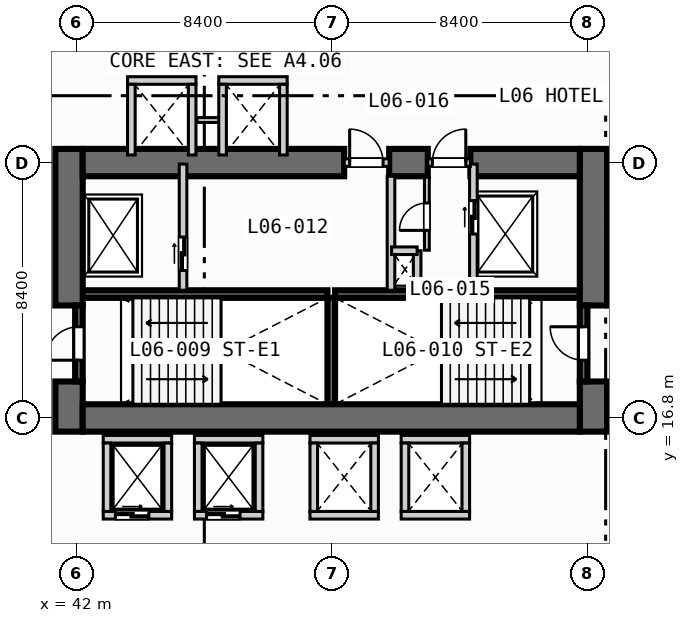
"""IFC4 building model, lengths in metres.
Left out: names, types, materials, properties, quantities, classifications, styles, units other than length and angle.
Written with IfcOpenShell. Run it as: python <this file> out.ifc"""

import sys

from ifc_helpers import new_model, si_unit, direction, frame, frame_2d, origin, place, context, subcontext, project, spatial, rectangle, extrude, element, fill, save


model = new_model("IFC4")
c1 = context("Model", 3, precision=1e-05, world=origin(), true_north=direction((0.0, 1.0)))
c2 = subcontext(c1, "Body", "Model", "MODEL_VIEW")
j1 = project(units=[si_unit("LENGTHUNIT", "METRE"), si_unit("PLANEANGLEUNIT", "RADIAN")], contexts=[c1])
p1 = place(None, origin())
s1 = spatial("IfcSite", under=j1, at=p1, CompositionType="ELEMENT")
p2 = place(p1, origin())
s2 = spatial("IfcBuilding", under=s1, at=p2, CompositionType="ELEMENT")
p3 = place(p2, frame((0.0, 0.0, 32.0)))
s3 = spatial("IfcBuildingStorey", under=s2, at=p3, CompositionType="ELEMENT", Elevation=32.0)
for number, where, z_axis, x_axis in (
    (1, (42.2, 20.875, 0.0), (0.0, 0.0, 1.0), (1.0, 0.0, 0.0)),
    (2, (50.5, 20.875, 0.0), (0.0, 0.0, 1.0), (1.0, 0.0, 0.0)),
):
    element("IfcWall", number, at=place(p3, frame(where, z_axis=z_axis, x_axis=x_axis)), inside=s3, PredefinedType="SOLIDWALL", context=c2, shape_type="SweptSolid", body=[
        extrude(rectangle(XDim=8.05, YDim=0.25, at=frame_2d((4.025, 0.0))), origin(), (0.0, 0.0, 1.0), 3.55),
    ])
p4 = place(p3, frame((50.375, 17.25, 0.0), z_axis=(0.0, 0.0, 1.0), x_axis=(0.0, 1.0, 0.0)))
e3 = element("IfcWall", 3, at=p4, inside=s3, PredefinedType="SOLIDWALL", context=c2, shape_type="SweptSolid", body=[
    extrude(rectangle(XDim=3.5, YDim=0.25, at=frame_2d((1.75, 0.0))), origin(), (0.0, 0.0, 1.0), 3.55),
])
p5 = place(p3, frame((41.75, 16.35, 0.0), z_axis=(0.0, 0.0, 1.0), x_axis=(0.0, 1.0, 0.0)))
e4 = element("IfcWall", 4, at=p5, inside=s3, PredefinedType="SHEAR", context=c2, shape_type="SweptSolid", body=[
    extrude(rectangle(XDim=1.65, YDim=0.9, at=frame_2d((0.825, 0.0))), origin(), (0.0, 0.0, 1.0), 3.55),
])
p6 = place(p3, frame((41.75, 20.5, 0.0), z_axis=(0.0, 0.0, 1.0), x_axis=(0.0, 1.0, 0.0)))
e5 = element("IfcWall", 5, at=p6, inside=s3, PredefinedType="SHEAR", context=c2, shape_type="SweptSolid", body=[
    extrude(rectangle(XDim=5.15, YDim=0.9, at=frame_2d((2.575, 0.0))), origin(), (0.0, 0.0, 1.0), 3.55),
])
p7 = place(p3, frame((59.0, 16.35, 0.0), z_axis=(0.0, 0.0, 1.0), x_axis=(0.0, 1.0, 0.0)))
e6 = element("IfcWall", 6, at=p7, inside=s3, PredefinedType="SHEAR", context=c2, shape_type="SweptSolid", body=[
    extrude(rectangle(XDim=1.65, YDim=0.9, at=frame_2d((0.825, 0.0))), origin(), (0.0, 0.0, 1.0), 3.55),
])
p8 = place(p3, frame((59.0, 20.5, 0.0), z_axis=(0.0, 0.0, 1.0), x_axis=(0.0, 1.0, 0.0)))
e7 = element("IfcWall", 7, at=p8, inside=s3, PredefinedType="SHEAR", context=c2, shape_type="SweptSolid", body=[
    extrude(rectangle(XDim=5.15, YDim=0.9, at=frame_2d((2.575, 0.0))), origin(), (0.0, 0.0, 1.0), 3.55),
])
p9 = place(p3, frame((42.2, 16.8, 0.0), z_axis=(0.0, 0.0, 1.0), x_axis=(1.0, 0.0, 0.0)))
e8 = element("IfcWall", 8, at=p9, inside=s3, PredefinedType="SHEAR", context=c2, shape_type="SweptSolid", body=[
    extrude(rectangle(XDim=16.35, YDim=0.9, at=frame_2d((8.175, 0.0))), origin(), (0.0, 0.0, 1.0), 3.55),
])
p10 = place(p3, frame((42.2, 25.2, 0.0), z_axis=(0.0, 0.0, 1.0), x_axis=(1.0, 0.0, 0.0)))
e9 = element("IfcWall", 9, at=p10, inside=s3, PredefinedType="SHEAR", context=c2, shape_type="SweptSolid", body=[
    extrude(rectangle(XDim=8.6, YDim=0.9, at=frame_2d((4.3, 0.0))), origin(), (0.0, 0.0, 1.0), 3.55),
])
p11 = place(p3, frame((52.28, 25.2, 0.0), z_axis=(0.0, 0.0, 1.0), x_axis=(1.0, 0.0, 0.0)))
e10 = element("IfcWall", 10, at=p11, inside=s3, PredefinedType="SHEAR", context=c2, shape_type="SweptSolid", body=[
    extrude(rectangle(XDim=1.27, YDim=0.9, at=frame_2d((0.635, 0.0))), origin(), (0.0, 0.0, 1.0), 3.55),
])
p12 = place(p3, frame((54.95, 25.2, 0.0), z_axis=(0.0, 0.0, 1.0), x_axis=(1.0, 0.0, 0.0)))
e11 = element("IfcWall", 11, at=p12, inside=s3, PredefinedType="SHEAR", context=c2, shape_type="SweptSolid", body=[
    extrude(rectangle(XDim=3.6, YDim=0.9, at=frame_2d((1.8, 0.0))), origin(), (0.0, 0.0, 1.0), 3.55),
])
p13 = place(p3, frame((42.075, 18.0, 0.0), z_axis=(0.0, 0.0, 1.0), x_axis=(0.0, 1.0, 0.0)))
e12 = element("IfcWall", 12, at=p13, inside=s3, PredefinedType="SOLIDWALL", context=c2, shape_type="SweptSolid", body=[
    extrude(rectangle(XDim=2.5, YDim=0.25, at=frame_2d((1.25, 0.0))), origin(), (0.0, 0.0, 1.0), 3.55),
])
p14 = place(p13, frame((0.7, 0.0, 0.0)))
e13 = element("IfcOpeningElement", 13, at=p14, cuts=e12, PredefinedType="OPENING", context=c2, shape_type="SweptSolid", body=[
    extrude(rectangle(XDim=1.1, YDim=2.15, at=frame_2d((0.55, 1.075))), frame((0.0, 0.135, 0.0), z_axis=(0.0, -1.0, 0.0), x_axis=(1.0, 0.0, 0.0)), (0.0, 0.0, 1.0), 0.27),
])
p15 = place(p3, frame((58.675, 18.0, 0.0), z_axis=(0.0, 0.0, 1.0), x_axis=(0.0, 1.0, 0.0)))
e14 = element("IfcWall", 14, at=p15, inside=s3, PredefinedType="SOLIDWALL", context=c2, shape_type="SweptSolid", body=[
    extrude(rectangle(XDim=2.5, YDim=0.25, at=frame_2d((1.25, 0.0))), origin(), (0.0, 0.0, 1.0), 3.55),
])
p16 = place(p15, frame((0.7, 0.0, 0.0)))
e15 = element("IfcOpeningElement", 15, at=p16, cuts=e14, PredefinedType="OPENING", context=c2, shape_type="SweptSolid", body=[
    extrude(rectangle(XDim=1.1, YDim=2.15, at=frame_2d((0.55, 1.075))), frame((0.0, 0.135, 0.0), z_axis=(0.0, -1.0, 0.0), x_axis=(1.0, 0.0, 0.0)), (0.0, 0.0, 1.0), 0.27),
])
p17 = place(p3, frame((45.5, 21.0, 0.0), z_axis=(0.0, 0.0, 1.0), x_axis=(0.0, 1.0, 0.0)))
e16 = element("IfcWall", 16, at=p17, inside=s3, PredefinedType="SOLIDWALL", context=c2, shape_type="SweptSolid", body=[
    extrude(rectangle(XDim=4.15, YDim=0.25, at=frame_2d((2.075, 0.0))), origin(), (0.0, 0.0, 1.0), 3.55),
])
p18 = place(p17, frame((0.65, 0.0, 0.0)))
e17 = element("IfcOpeningElement", 17, at=p18, cuts=e16, PredefinedType="OPENING", context=c2, shape_type="SweptSolid", body=[
    extrude(rectangle(XDim=1.1, YDim=2.15, at=frame_2d((0.55, 1.075))), frame((0.0, 0.135, 0.0), z_axis=(0.0, -1.0, 0.0), x_axis=(1.0, 0.0, 0.0)), (0.0, 0.0, 1.0), 0.27),
])
p19 = place(p3, frame((50.8, 25.2, 0.0), z_axis=(0.0, 0.0, 1.0), x_axis=(1.0, 0.0, 0.0)))
e18 = element("IfcWall", 18, at=p19, inside=s3, PredefinedType="SOLIDWALL", context=c2, shape_type="SweptSolid", body=[
    extrude(rectangle(XDim=1.48, YDim=0.25, at=frame_2d((0.74, 0.0))), origin(), (0.0, 0.0, 1.0), 3.55),
])
p20 = place(p19, frame((0.18, 0.0, 0.0)))
e19 = element("IfcOpeningElement", 19, at=p20, cuts=e18, PredefinedType="OPENING", context=c2, shape_type="SweptSolid", body=[
    extrude(rectangle(XDim=1.1, YDim=2.15, at=frame_2d((0.55, 1.075))), frame((0.0, 0.135, 0.0), z_axis=(0.0, -1.0, 0.0), x_axis=(1.0, 0.0, 0.0)), (0.0, 0.0, 1.0), 0.27),
])
p21 = place(p3, frame((52.34, 21.0, 0.0), z_axis=(0.0, 0.0, 1.0), x_axis=(0.0, 1.0, 0.0)))
e20 = element("IfcWall", 20, at=p21, inside=s3, PredefinedType="SOLIDWALL", context=c2, shape_type="SweptSolid", body=[
    extrude(rectangle(XDim=3.75, YDim=0.25, at=frame_2d((1.875, 0.0))), origin(), (0.0, 0.0, 1.0), 3.55),
])
p22 = place(p3, frame((55.05, 21.0, 0.0), z_axis=(0.0, 0.0, 1.0), x_axis=(0.0, 1.0, 0.0)))
e21 = element("IfcWall", 21, at=p22, inside=s3, PredefinedType="SOLIDWALL", context=c2, shape_type="SweptSolid", body=[
    extrude(rectangle(XDim=4.15, YDim=0.25, at=frame_2d((2.075, 0.0))), origin(), (0.0, 0.0, 1.0), 3.55),
])
p23 = place(p22, frame((1.85, 0.0, 0.0)))
e22 = element("IfcOpeningElement", 22, at=p23, cuts=e21, PredefinedType="OPENING", context=c2, shape_type="SweptSolid", body=[
    extrude(rectangle(XDim=1.1, YDim=2.15, at=frame_2d((0.55, 1.075))), frame((0.0, 0.135, 0.0), z_axis=(0.0, -1.0, 0.0), x_axis=(1.0, 0.0, 0.0)), (0.0, 0.0, 1.0), 0.27),
])
p24 = place(p3, frame((53.55, 25.2, 0.0), z_axis=(0.0, 0.0, 1.0), x_axis=(1.0, 0.0, 0.0)))
e23 = element("IfcWall", 23, at=p24, inside=s3, PredefinedType="SOLIDWALL", context=c2, shape_type="SweptSolid", body=[
    extrude(rectangle(XDim=1.4, YDim=0.25, at=frame_2d((0.7, 0.0))), origin(), (0.0, 0.0, 1.0), 3.55),
])
p25 = place(p24, frame((0.15, 0.0, 0.0)))
e24 = element("IfcOpeningElement", 24, at=p25, cuts=e23, PredefinedType="OPENING", context=c2, shape_type="SweptSolid", body=[
    extrude(rectangle(XDim=1.1, YDim=2.15, at=frame_2d((0.55, 1.075))), frame((0.0, 0.135, 0.0), z_axis=(0.0, -1.0, 0.0), x_axis=(1.0, 0.0, 0.0)), (0.0, 0.0, 1.0), 0.27),
])
p26 = place(p3, frame((53.2, 21.0, 0.0), z_axis=(0.0, 0.0, 1.0), x_axis=(0.0, 1.0, 0.0)))
e25 = element("IfcWall", 25, at=p26, inside=s3, PredefinedType="SOLIDWALL", context=c2, shape_type="SweptSolid", body=[
    extrude(rectangle(XDim=1.3, YDim=0.25, at=frame_2d((0.65, 0.0))), origin(), (0.0, 0.0, 1.0), 3.55),
])
p27 = place(p3, frame((52.36, 22.3, 0.0), z_axis=(0.0, 0.0, 1.0), x_axis=(1.0, 0.0, 0.0)))
e26 = element("IfcWall", 26, at=p27, inside=s3, PredefinedType="SOLIDWALL", context=c2, shape_type="SweptSolid", body=[
    extrude(rectangle(XDim=0.84, YDim=0.25, at=frame_2d((0.42, 0.0))), origin(), (0.0, 0.0, 1.0), 3.55),
])
p28 = place(p3, frame((53.52, 22.32, 0.0), z_axis=(0.0, 0.0, 1.0), x_axis=(0.0, 1.0, 0.0)))
e27 = element("IfcWall", 27, at=p28, inside=s3, PredefinedType="PARTITIONING", context=c2, shape_type="SweptSolid", body=[
    extrude(rectangle(XDim=2.4, YDim=0.16, at=frame_2d((1.2, 0.0))), origin(), (0.0, 0.0, 1.0), 3.55),
])
p29 = place(p28, frame((0.65, 0.0, 0.0)))
e28 = element("IfcOpeningElement", 28, at=p29, cuts=e27, PredefinedType="OPENING", context=c2, shape_type="SweptSolid", body=[
    extrude(rectangle(XDim=0.9, YDim=2.1, at=frame_2d((0.45, 1.05))), frame((0.0, 0.09, 0.0), z_axis=(0.0, -1.0, 0.0), x_axis=(1.0, 0.0, 0.0)), (0.0, 0.0, 1.0), 0.18),
])
p30 = place(p3, frame((42.875, 13.6, 0.0), z_axis=(0.0, 0.0, 1.0), x_axis=(1.0, 0.0, 0.0)))
e29 = element("IfcWall", 29, at=p30, inside=s3, PredefinedType="SOLIDWALL", context=c2, shape_type="SweptSolid", body=[
    extrude(rectangle(XDim=2.25, YDim=0.25, at=frame_2d((1.125, 0.0))), origin(), (0.0, 0.0, 1.0), 3.55),
])
p31 = place(p30, frame((0.4, 0.0, 0.0)))
e30 = element("IfcOpeningElement", 30, at=p31, cuts=e29, PredefinedType="OPENING", context=c2, shape_type="SweptSolid", body=[
    extrude(rectangle(XDim=1.1, YDim=2.15, at=frame_2d((0.55, 1.075))), frame((0.0, 0.135, 0.0), z_axis=(0.0, -1.0, 0.0), x_axis=(1.0, 0.0, 0.0)), (0.0, 0.0, 1.0), 0.27),
])
for number, where, z_axis, x_axis in (
    (31, (42.875, 16.1, 0.0), (0.0, 0.0, 1.0), (1.0, 0.0, 0.0)),
    (32, (43.0, 13.725, 0.0), (0.0, 0.0, 1.0), (0.0, 1.0, 0.0)),
    (33, (45.0, 13.725, 0.0), (0.0, 0.0, 1.0), (0.0, 1.0, 0.0)),
):
    element("IfcWall", number, at=place(p3, frame(where, z_axis=z_axis, x_axis=x_axis)), inside=s3, PredefinedType="SOLIDWALL", context=c2, shape_type="SweptSolid", body=[
        extrude(rectangle(XDim=2.25, YDim=0.25, at=frame_2d((1.125, 0.0))), origin(), (0.0, 0.0, 1.0), 3.55),
    ])
p32 = place(p3, frame((45.875, 13.6, 0.0), z_axis=(0.0, 0.0, 1.0), x_axis=(1.0, 0.0, 0.0)))
e34 = element("IfcWall", 34, at=p32, inside=s3, PredefinedType="SOLIDWALL", context=c2, shape_type="SweptSolid", body=[
    extrude(rectangle(XDim=2.25, YDim=0.25, at=frame_2d((1.125, 0.0))), origin(), (0.0, 0.0, 1.0), 3.55),
])
p33 = place(p32, frame((0.4, 0.0, 0.0)))
e35 = element("IfcOpeningElement", 35, at=p33, cuts=e34, PredefinedType="OPENING", context=c2, shape_type="SweptSolid", body=[
    extrude(rectangle(XDim=1.1, YDim=2.15, at=frame_2d((0.55, 1.075))), frame((0.0, 0.135, 0.0), z_axis=(0.0, -1.0, 0.0), x_axis=(1.0, 0.0, 0.0)), (0.0, 0.0, 1.0), 0.27),
])
for number, where, z_axis, x_axis in (
    (36, (45.875, 16.1, 0.0), (0.0, 0.0, 1.0), (1.0, 0.0, 0.0)),
    (37, (46.0, 13.725, 0.0), (0.0, 0.0, 1.0), (0.0, 1.0, 0.0)),
    (38, (48.0, 13.725, 0.0), (0.0, 0.0, 1.0), (0.0, 1.0, 0.0)),
    (39, (49.675, 13.6, 0.0), (0.0, 0.0, 1.0), (1.0, 0.0, 0.0)),
    (40, (49.675, 16.1, 0.0), (0.0, 0.0, 1.0), (1.0, 0.0, 0.0)),
    (41, (49.8, 13.725, 0.0), (0.0, 0.0, 1.0), (0.0, 1.0, 0.0)),
    (42, (51.8, 13.725, 0.0), (0.0, 0.0, 1.0), (0.0, 1.0, 0.0)),
    (43, (52.675, 13.6, 0.0), (0.0, 0.0, 1.0), (1.0, 0.0, 0.0)),
    (44, (52.675, 16.1, 0.0), (0.0, 0.0, 1.0), (1.0, 0.0, 0.0)),
    (45, (52.8, 13.725, 0.0), (0.0, 0.0, 1.0), (0.0, 1.0, 0.0)),
    (46, (54.8, 13.725, 0.0), (0.0, 0.0, 1.0), (0.0, 1.0, 0.0)),
    (47, (43.675, 27.9, 0.0), (0.0, 0.0, 1.0), (1.0, 0.0, 0.0)),
):
    element("IfcWall", number, at=place(p3, frame(where, z_axis=z_axis, x_axis=x_axis)), inside=s3, PredefinedType="SOLIDWALL", context=c2, shape_type="SweptSolid", body=[
        extrude(rectangle(XDim=2.25, YDim=0.25, at=frame_2d((1.125, 0.0))), origin(), (0.0, 0.0, 1.0), 3.55),
    ])
for number, where, z_axis, x_axis in (
    (48, (43.8, 25.45, 0.0), (0.0, 0.0, 1.0), (0.0, 1.0, 0.0)),
    (49, (45.8, 25.45, 0.0), (0.0, 0.0, 1.0), (0.0, 1.0, 0.0)),
):
    element("IfcWall", number, at=place(p3, frame(where, z_axis=z_axis, x_axis=x_axis)), inside=s3, PredefinedType="SOLIDWALL", context=c2, shape_type="SweptSolid", body=[
        extrude(rectangle(XDim=2.325, YDim=0.25, at=frame_2d((1.163, 0.0))), origin(), (0.0, 0.0, 1.0), 3.55),
    ])
p34 = place(p3, frame((45.96, 26.6, 0.0), z_axis=(0.0, 0.0, 1.0), x_axis=(1.0, 0.0, 0.0)))
e50 = element("IfcWall", 50, at=p34, inside=s3, PredefinedType="PARTITIONING", context=c2, shape_type="SweptSolid", body=[
    extrude(rectangle(XDim=0.88, YDim=0.16, at=frame_2d((0.44, 0.0))), origin(), (0.0, 0.0, 1.0), 3.55),
])
p35 = place(p3, frame((46.675, 27.9, 0.0), z_axis=(0.0, 0.0, 1.0), x_axis=(1.0, 0.0, 0.0)))
e51 = element("IfcWall", 51, at=p35, inside=s3, PredefinedType="SOLIDWALL", context=c2, shape_type="SweptSolid", body=[
    extrude(rectangle(XDim=2.25, YDim=0.25, at=frame_2d((1.125, 0.0))), origin(), (0.0, 0.0, 1.0), 3.55),
])
for number, where, z_axis, x_axis in (
    (52, (46.8, 25.45, 0.0), (0.0, 0.0, 1.0), (0.0, 1.0, 0.0)),
    (53, (48.8, 25.45, 0.0), (0.0, 0.0, 1.0), (0.0, 1.0, 0.0)),
):
    element("IfcWall", number, at=place(p3, frame(where, z_axis=z_axis, x_axis=x_axis)), inside=s3, PredefinedType="SOLIDWALL", context=c2, shape_type="SweptSolid", body=[
        extrude(rectangle(XDim=2.325, YDim=0.25, at=frame_2d((1.163, 0.0))), origin(), (0.0, 0.0, 1.0), 3.55),
    ])
p36 = place(p14, origin())
e54 = element("IfcDoor", 54, at=p36, inside=s3, OperationType="SINGLE_SWING_LEFT", PredefinedType="DOOR", context=c2, shape_type="SweptSolid", body=[
    extrude(rectangle(XDim=1.1, YDim=2.15, at=frame_2d((0.55, 1.075))), frame((0.0, 0.025, 0.0), z_axis=(0.0, -1.0, 0.0), x_axis=(1.0, 0.0, 0.0)), (0.0, 0.0, 1.0), 0.05),
])
fill(e13, e54)
p37 = place(p16, origin())
e55 = element("IfcDoor", 55, at=p37, inside=s3, OperationType="SINGLE_SWING_RIGHT", PredefinedType="DOOR", context=c2, shape_type="SweptSolid", body=[
    extrude(rectangle(XDim=1.1, YDim=2.15, at=frame_2d((0.55, 1.075))), frame((0.0, 0.025, 0.0), z_axis=(0.0, -1.0, 0.0), x_axis=(1.0, 0.0, 0.0)), (0.0, 0.0, 1.0), 0.05),
])
fill(e15, e55)
p38 = place(p18, origin())
e56 = element("IfcDoor", 56, at=p38, inside=s3, OperationType="SLIDING_TO_LEFT", PredefinedType="DOOR", context=c2, shape_type="SweptSolid", body=[
    extrude(rectangle(XDim=1.1, YDim=2.15, at=frame_2d((0.55, 1.075))), frame((0.0, 0.025, 0.0), z_axis=(0.0, -1.0, 0.0), x_axis=(1.0, 0.0, 0.0)), (0.0, 0.0, 1.0), 0.05),
])
fill(e17, e56)
p39 = place(p20, origin())
e57 = element("IfcDoor", 57, at=p39, inside=s3, OperationType="SINGLE_SWING_LEFT", PredefinedType="DOOR", context=c2, shape_type="SweptSolid", body=[
    extrude(rectangle(XDim=1.1, YDim=2.15, at=frame_2d((0.55, 1.075))), frame((0.0, 0.025, 0.0), z_axis=(0.0, -1.0, 0.0), x_axis=(1.0, 0.0, 0.0)), (0.0, 0.0, 1.0), 0.05),
])
fill(e19, e57)
p40 = place(p23, origin())
e58 = element("IfcDoor", 58, at=p40, inside=s3, OperationType="SLIDING_TO_LEFT", PredefinedType="DOOR", context=c2, shape_type="SweptSolid", body=[
    extrude(rectangle(XDim=1.1, YDim=2.15, at=frame_2d((0.55, 1.075))), frame((0.0, 0.025, 0.0), z_axis=(0.0, -1.0, 0.0), x_axis=(1.0, 0.0, 0.0)), (0.0, 0.0, 1.0), 0.05),
])
fill(e22, e58)
p41 = place(p25, origin())
e59 = element("IfcDoor", 59, at=p41, inside=s3, OperationType="SINGLE_SWING_RIGHT", PredefinedType="DOOR", context=c2, shape_type="SweptSolid", body=[
    extrude(rectangle(XDim=1.1, YDim=2.15, at=frame_2d((0.55, 1.075))), frame((0.0, 0.025, 0.0), z_axis=(0.0, -1.0, 0.0), x_axis=(1.0, 0.0, 0.0)), (0.0, 0.0, 1.0), 0.05),
])
fill(e24, e59)
p42 = place(p29, origin())
e60 = element("IfcDoor", 60, at=p42, inside=s3, OperationType="SINGLE_SWING_LEFT", PredefinedType="DOOR", context=c2, shape_type="SweptSolid", body=[
    extrude(rectangle(XDim=0.9, YDim=2.1, at=frame_2d((0.45, 1.05))), frame((0.0, 0.025, 0.0), z_axis=(0.0, -1.0, 0.0), x_axis=(1.0, 0.0, 0.0)), (0.0, 0.0, 1.0), 0.05),
])
fill(e28, e60)
p43 = place(p31, origin())
e61 = element("IfcDoor", 61, at=p43, inside=s3, OperationType="SLIDING_TO_LEFT", PredefinedType="DOOR", context=c2, shape_type="SweptSolid", body=[
    extrude(rectangle(XDim=1.1, YDim=2.15, at=frame_2d((0.55, 1.075))), frame((0.0, 0.025, 0.0), z_axis=(0.0, -1.0, 0.0), x_axis=(1.0, 0.0, 0.0)), (0.0, 0.0, 1.0), 0.05),
])
fill(e30, e61)
p44 = place(p33, origin())
e62 = element("IfcDoor", 62, at=p44, inside=s3, OperationType="SLIDING_TO_LEFT", PredefinedType="DOOR", context=c2, shape_type="SweptSolid", body=[
    extrude(rectangle(XDim=1.1, YDim=2.15, at=frame_2d((0.55, 1.075))), frame((0.0, 0.025, 0.0), z_axis=(0.0, -1.0, 0.0), x_axis=(1.0, 0.0, 0.0)), (0.0, 0.0, 1.0), 0.05),
])
fill(e35, e62)
save(model, sys.argv[1])
